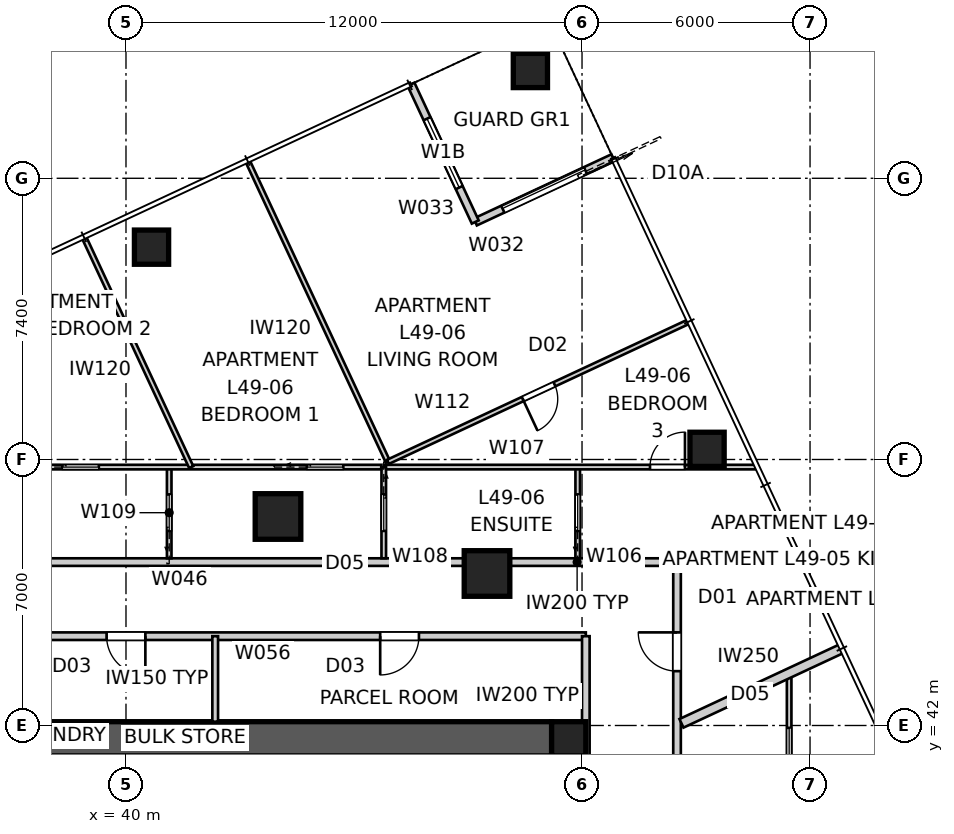
"""IFC4 building model, lengths in metres.
Left out: names, types, materials, properties, quantities, classifications, styles, units other than length and angle.
Written with IfcOpenShell. Run it as: python <this file> out.ifc"""

import sys

from ifc_helpers import new_model, si_unit, direction, frame, frame_2d, origin, origin_2d, place, context, subcontext, project, spatial, polyline, rectangle, outline, extrude, element, fill, save


model = new_model("IFC4")
c1 = context("Model", 3, precision=1e-05, world=origin(), true_north=direction((0.0, 1.0)))
c2 = subcontext(c1, "Body", "Model", "MODEL_VIEW")
j1 = project(units=[si_unit("LENGTHUNIT", "METRE"), si_unit("PLANEANGLEUNIT", "RADIAN")], contexts=[c1])
p1 = place(None, origin())
s1 = spatial("IfcSite", under=j1, at=p1, CompositionType="ELEMENT")
p2 = place(p1, origin())
s2 = spatial("IfcBuilding", under=s1, at=p2, CompositionType="ELEMENT")
p3 = place(p2, frame((0.0, 0.0, 179.4)))
s3 = spatial("IfcBuildingStorey", under=s2, at=p3, CompositionType="ELEMENT", Elevation=179.4)
p4 = place(p3, frame((28.8, 41.65, 0.0), z_axis=(0.0, 0.0, 1.0), x_axis=(1.0, 0.0, 0.0)))
e1 = element("IfcWall", 1, at=p4, inside=s3, PredefinedType="SHEAR", context=c2, shape_type="SweptSolid", body=[
    extrude(outline(polyline([(0.0, -0.45), (22.4, -0.45), (22.4, -0.025), (22.85, -0.025), (22.85, 0.025), (22.4, 0.025), (22.4, 0.45), (0.0, 0.45), (0.0, 0.025), (-0.45, 0.025), (-0.45, -0.025), (0.0, -0.025), (0.0, -0.45)])), origin(), (0.0, 0.0, 1.0), 3.4),
])
p5 = place(p3, frame((51.65, 18.8, 0.0), z_axis=(0.0, 0.0, 1.0), x_axis=(0.0, 1.0, 0.0)))
e2 = element("IfcWall", 2, at=p5, inside=s3, PredefinedType="SHEAR", context=c2, shape_type="SweptSolid", body=[
    extrude(outline(polyline([(0.0, -0.45), (22.4, -0.45), (22.4, -0.025), (22.85, -0.025), (22.85, 0.025), (22.4, 0.025), (22.4, 0.45), (0.0, 0.45), (0.0, 0.025), (-0.45, 0.025), (-0.45, -0.025), (0.0, -0.025), (0.0, -0.45)])), origin(), (0.0, 0.0, 1.0), 3.4),
])
p6 = place(p5, frame((11.14, 0.0, 0.0)))
e3 = element("IfcOpeningElement", 3, at=p6, cuts=e2, PredefinedType="OPENING", context=c2, shape_type="SweptSolid", body=[
    extrude(rectangle(XDim=1.02, YDim=2.4, at=frame_2d((0.51, 1.2))), frame((0.0, 0.46, 0.0), z_axis=(0.0, -1.0, 0.0), x_axis=(1.0, 0.0, 0.0)), (0.0, 0.0, 1.0), 0.92),
])
for number, where, z_axis, x_axis in (
    (4, (51.65, 41.65, 0.0), (0.0, 0.0, 1.0), (1.0, 0.0, 0.0)),
    (5, (55.29, 49.267, 0.0), (0.0, 0.0, 1.0), (1.0, 0.0, 0.0)),
    (6, (50.641, 59.236, 0.0), (0.0, 0.0, 1.0), (1.0, 0.0, 0.0)),
    (7, (40.672, 54.588, 0.0), (0.0, 0.0, 1.0), (1.0, 0.0, 0.0)),
):
    element("IfcColumn", number, at=place(p3, frame(where, z_axis=z_axis, x_axis=x_axis)), inside=s3, PredefinedType="COLUMN", context=c2, shape_type="SweptSolid", body=[
        extrude(rectangle(XDim=0.9, YDim=0.9, at=origin_2d()), origin(), (0.0, 0.0, 1.0), 3.4),
    ])
for number, where, z_axis, x_axis in (
    (8, (49.5, 46.0, 0.0), (0.0, 0.0, 1.0), (1.0, 0.0, 0.0)),
    (9, (44.0, 47.5, 0.0), (0.0, 0.0, 1.0), (1.0, 0.0, 0.0)),
):
    element("IfcColumn", number, at=place(p3, frame(where, z_axis=z_axis, x_axis=x_axis)), inside=s3, PredefinedType="COLUMN", context=c2, shape_type="SweptSolid", body=[
        extrude(rectangle(XDim=1.2, YDim=1.2, at=origin_2d()), origin(), (0.0, 0.0, 1.0), 3.4),
    ])
p7 = place(p3, frame((52.815, 56.94, 0.0), z_axis=(0.0, 0.0, 1.0), x_axis=(-0.906289140828, -0.422658246362, 0.0)))
e10 = element("IfcWall", 10, at=p7, inside=s3, PredefinedType="SOLIDWALL", context=c2, shape_type="SweptSolid", body=[
    extrude(rectangle(XDim=4.0, YDim=0.2, at=frame_2d((2.0, 0.0))), origin(), (0.0, 0.0, 1.0), 3.25),
])
p8 = place(p7, frame((0.8, 0.0, 0.0)))
e11 = element("IfcOpeningElement", 11, at=p8, cuts=e10, PredefinedType="OPENING", context=c2, shape_type="SweptSolid", body=[
    extrude(rectangle(XDim=2.4, YDim=2.1, at=frame_2d((1.2, 1.05))), frame((0.0, 0.11, 0.0), z_axis=(0.0, -1.0, 0.0), x_axis=(1.0, 0.0, 0.0)), (0.0, 0.0, 1.0), 0.22),
])
p9 = place(p3, frame((49.19, 55.25, 0.0), z_axis=(0.0, 0.0, 1.0), x_axis=(-0.422658246362, 0.906289140828, 0.0)))
e12 = element("IfcWall", 12, at=p9, inside=s3, PredefinedType="SOLIDWALL", context=c2, shape_type="SweptSolid", body=[
    extrude(rectangle(XDim=4.0, YDim=0.2, at=frame_2d((2.0, 0.0))), origin(), (0.0, 0.0, 1.0), 3.25),
])
p10 = place(p9, frame((1.0, 0.0, 0.45)))
e13 = element("IfcOpeningElement", 13, at=p10, cuts=e12, PredefinedType="OPENING", context=c2, shape_type="SweptSolid", body=[
    extrude(rectangle(XDim=2.0, YDim=1.8, at=frame_2d((1.0, 0.9))), frame((0.0, 0.11, 0.0), z_axis=(0.0, -1.0, 0.0), x_axis=(1.0, 0.0, 0.0)), (0.0, 0.0, 1.0), 0.22),
])
p11 = place(p3, frame((54.5, 13.7, 0.0), z_axis=(0.0, 0.0, 1.0), x_axis=(0.0, 1.0, 0.0)))
e14 = element("IfcWall", 14, at=p11, inside=s3, PredefinedType="PARTITIONING", context=c2, shape_type="SweptSolid", body=[
    extrude(rectangle(XDim=32.6, YDim=0.2, at=frame_2d((16.3, 0.0))), origin(), (0.0, 0.0, 1.0), 3.25),
])
p12 = place(p11, frame((3.326, 0.0, 0.0)))
e15 = element("IfcOpeningElement", 15, at=p12, cuts=e14, PredefinedType="OPENING", context=c2, shape_type="SweptSolid", body=[
    extrude(rectangle(XDim=1.02, YDim=2.34, at=frame_2d((0.51, 1.17))), frame((0.0, 0.11, 0.0), z_axis=(0.0, -1.0, 0.0), x_axis=(1.0, 0.0, 0.0)), (0.0, 0.0, 1.0), 0.22),
])
p13 = place(p11, frame((19.161, 0.0, 0.0)))
e16 = element("IfcOpeningElement", 16, at=p13, cuts=e14, PredefinedType="OPENING", context=c2, shape_type="SweptSolid", body=[
    extrude(rectangle(XDim=1.02, YDim=2.34, at=frame_2d((0.51, 1.17))), frame((0.0, 0.11, 0.0), z_axis=(0.0, -1.0, 0.0), x_axis=(1.0, 0.0, 0.0)), (0.0, 0.0, 1.0), 0.22),
])
p14 = place(p11, frame((29.73, 0.0, 0.0)))
e17 = element("IfcOpeningElement", 17, at=p14, cuts=e14, PredefinedType="OPENING", context=c2, shape_type="SweptSolid", body=[
    extrude(rectangle(XDim=1.02, YDim=2.34, at=frame_2d((0.51, 1.17))), frame((0.0, 0.11, 0.0), z_axis=(0.0, -1.0, 0.0), x_axis=(1.0, 0.0, 0.0)), (0.0, 0.0, 1.0), 0.22),
])
p15 = place(p11, frame((23.904, 0.0, 0.0)))
e18 = element("IfcOpeningElement", 18, at=p15, cuts=e14, PredefinedType="OPENING", context=c2, shape_type="SweptSolid", body=[
    extrude(rectangle(XDim=1.02, YDim=2.34, at=frame_2d((0.51, 1.17))), frame((0.0, 0.11, 0.0), z_axis=(0.0, -1.0, 0.0), x_axis=(1.0, 0.0, 0.0)), (0.0, 0.0, 1.0), 0.22),
])
p16 = place(p3, frame((54.5, 46.3, 0.0), z_axis=(0.0, 0.0, 1.0), x_axis=(-1.0, 0.0, 0.0)))
e19 = element("IfcWall", 19, at=p16, inside=s3, PredefinedType="PARTITIONING", context=c2, shape_type="SweptSolid", body=[
    extrude(rectangle(XDim=5.258, YDim=0.2, at=frame_2d((2.629, 0.0))), origin(), (0.0, 0.0, 1.0), 3.25),
])
p17 = place(p3, frame((49.242, 46.3, 0.0), z_axis=(0.0, 0.0, 1.0), x_axis=(-1.0, 0.0, 0.0)))
e20 = element("IfcWall", 20, at=p17, inside=s3, PredefinedType="PARTITIONING", context=c2, shape_type="SweptSolid", body=[
    extrude(rectangle(XDim=1.683, YDim=0.2, at=frame_2d((0.842, 0.0))), origin(), (0.0, 0.0, 1.0), 2.55),
])
p18 = place(p3, frame((47.558, 46.3, 0.0), z_axis=(0.0, 0.0, 1.0), x_axis=(-1.0, 0.0, 0.0)))
e21 = element("IfcWall", 21, at=p18, inside=s3, PredefinedType="PARTITIONING", context=c2, shape_type="SweptSolid", body=[
    extrude(rectangle(XDim=15.117, YDim=0.2, at=frame_2d((7.558, 0.0))), origin(), (0.0, 0.0, 1.0), 3.25),
])
p19 = place(p18, frame((12.295, 0.0, 0.0)))
e22 = element("IfcOpeningElement", 22, at=p19, cuts=e21, PredefinedType="OPENING", context=c2, shape_type="SweptSolid", body=[
    extrude(rectangle(XDim=1.02, YDim=2.34, at=frame_2d((0.51, 1.17))), frame((0.0, 0.11, 0.0), z_axis=(0.0, -1.0, 0.0), x_axis=(1.0, 0.0, 0.0)), (0.0, 0.0, 1.0), 0.22),
])
p20 = place(p3, frame((58.838, 44.025, 0.0), z_axis=(0.0, 0.0, 1.0), x_axis=(-0.906317010604, -0.422598481173, 0.0)))
e23 = element("IfcWall", 23, at=p20, inside=s3, PredefinedType="PARTITIONING", context=c2, shape_type="SweptSolid", body=[
    extrude(rectangle(XDim=4.657, YDim=0.25, at=frame_2d((2.329, 0.0))), origin(), (0.0, 0.0, 1.0), 3.25),
])
p21 = place(p3, frame((52.1, 44.35, 0.0), z_axis=(0.0, 0.0, 1.0), x_axis=(-1.0, 0.0, 0.0)))
e24 = element("IfcWall", 24, at=p21, inside=s3, PredefinedType="PARTITIONING", context=c2, shape_type="SweptSolid", body=[
    extrude(rectangle(XDim=24.2, YDim=0.2, at=frame_2d((12.1, 0.0))), origin(), (0.0, 0.0, 1.0), 3.25),
])
p22 = place(p21, frame((18.789, 0.0, 0.0)))
e25 = element("IfcOpeningElement", 25, at=p22, cuts=e24, PredefinedType="OPENING", context=c2, shape_type="SweptSolid", body=[
    extrude(rectangle(XDim=1.02, YDim=2.1, at=frame_2d((0.51, 1.05))), frame((0.0, 0.11, 0.0), z_axis=(0.0, -1.0, 0.0), x_axis=(1.0, 0.0, 0.0)), (0.0, 0.0, 1.0), 0.22),
])
p23 = place(p21, frame((4.391, 0.0, 0.0)))
e26 = element("IfcOpeningElement", 26, at=p23, cuts=e24, PredefinedType="OPENING", context=c2, shape_type="SweptSolid", body=[
    extrude(rectangle(XDim=1.02, YDim=2.1, at=frame_2d((0.51, 1.05))), frame((0.0, 0.11, 0.0), z_axis=(0.0, -1.0, 0.0), x_axis=(1.0, 0.0, 0.0)), (0.0, 0.0, 1.0), 0.22),
])
p24 = place(p21, frame((11.59, 0.0, 0.0)))
e27 = element("IfcOpeningElement", 27, at=p24, cuts=e24, PredefinedType="OPENING", context=c2, shape_type="SweptSolid", body=[
    extrude(rectangle(XDim=1.02, YDim=2.1, at=frame_2d((0.51, 1.05))), frame((0.0, 0.11, 0.0), z_axis=(0.0, -1.0, 0.0), x_axis=(1.0, 0.0, 0.0)), (0.0, 0.0, 1.0), 0.22),
])
p25 = place(p3, frame((52.1, 41.18, 0.0), z_axis=(0.0, 0.0, 1.0), x_axis=(0.0, 1.0, 0.0)))
e28 = element("IfcWall", 28, at=p25, inside=s3, PredefinedType="PARTITIONING", context=c2, shape_type="SweptSolid", body=[
    extrude(rectangle(XDim=3.17, YDim=0.2, at=frame_2d((1.585, 0.0))), origin(), (0.0, 0.0, 1.0), 3.25),
])
p26 = place(p3, frame((42.347, 42.1, 0.0), z_axis=(0.0, 0.0, 1.0), x_axis=(0.0, 1.0, 0.0)))
e29 = element("IfcWall", 29, at=p26, inside=s3, PredefinedType="SOLIDWALL", context=c2, shape_type="SweptSolid", body=[
    extrude(rectangle(XDim=2.25, YDim=0.15, at=frame_2d((1.125, 0.0))), origin(), (0.0, 0.0, 1.0), 3.25),
])
p27 = place(p3, frame((57.45, 39.538, 0.0), z_axis=(0.0, 0.0, 1.0), x_axis=(0.0, 1.0, 0.0)))
e30 = element("IfcWall", 30, at=p27, inside=s3, PredefinedType="PARTITIONING", context=c2, shape_type="SweptSolid", body=[
    extrude(rectangle(XDim=3.84, YDim=0.12, at=frame_2d((1.92, 0.0))), origin(), (0.0, 0.0, 1.0), 3.25),
])
p28 = place(p27, frame((1.44, 0.0, 0.0)))
e31 = element("IfcOpeningElement", 31, at=p28, cuts=e30, PredefinedType="OPENING", context=c2, shape_type="SweptSolid", body=[
    extrude(rectangle(XDim=0.96, YDim=2.1, at=frame_2d((0.48, 1.05))), frame((0.0, 0.07, 0.0), z_axis=(0.0, -1.0, 0.0), x_axis=(1.0, 0.0, 0.0)), (0.0, 0.0, 1.0), 0.14),
])
p29 = place(p3, frame((51.886, 46.4, 0.0), z_axis=(0.0, 0.0, 1.0), x_axis=(0.0, 1.0, 0.0)))
e32 = element("IfcWall", 32, at=p29, inside=s3, PredefinedType="PARTITIONING", context=c2, shape_type="SweptSolid", body=[
    extrude(rectangle(XDim=2.4, YDim=0.12, at=frame_2d((1.2, 0.0))), origin(), (0.0, 0.0, 1.0), 3.25),
])
p30 = place(p29, frame((0.72, 0.0, 0.0)))
e33 = element("IfcOpeningElement", 33, at=p30, cuts=e32, PredefinedType="OPENING", context=c2, shape_type="SweptSolid", body=[
    extrude(rectangle(XDim=0.96, YDim=2.1, at=frame_2d((0.48, 1.05))), frame((0.0, 0.07, 0.0), z_axis=(0.0, -1.0, 0.0), x_axis=(1.0, 0.0, 0.0)), (0.0, 0.0, 1.0), 0.14),
])
p31 = place(p3, frame((46.783, 48.8, 0.0), z_axis=(0.0, 0.0, 1.0), x_axis=(1.0, 0.0, 0.0)))
e34 = element("IfcWall", 34, at=p31, inside=s3, PredefinedType="PARTITIONING", context=c2, shape_type="SweptSolid", body=[
    extrude(rectangle(XDim=9.784, YDim=0.12, at=frame_2d((4.892, 0.0))), origin(), (0.0, 0.0, 1.0), 3.25),
])
p32 = place(p31, frame((7.006, 0.0, 0.0)))
e35 = element("IfcOpeningElement", 35, at=p32, cuts=e34, PredefinedType="OPENING", context=c2, shape_type="SweptSolid", body=[
    extrude(rectangle(XDim=0.92, YDim=2.34, at=frame_2d((0.46, 1.17))), frame((0.0, 0.07, 0.0), z_axis=(0.0, -1.0, 0.0), x_axis=(1.0, 0.0, 0.0)), (0.0, 0.0, 1.0), 0.14),
])
p33 = place(p3, frame((46.783, 48.8, 0.0), z_axis=(0.0, 0.0, 1.0), x_axis=(0.0, -1.0, 0.0)))
e36 = element("IfcWall", 36, at=p33, inside=s3, PredefinedType="PARTITIONING", context=c2, shape_type="SweptSolid", body=[
    extrude(rectangle(XDim=2.4, YDim=0.12, at=frame_2d((1.2, 0.0))), origin(), (0.0, 0.0, 1.0), 3.25),
])
p34 = place(p33, frame((0.72, 0.0, 0.0)))
e37 = element("IfcOpeningElement", 37, at=p34, cuts=e36, PredefinedType="OPENING", context=c2, shape_type="SweptSolid", body=[
    extrude(rectangle(XDim=0.96, YDim=2.1, at=frame_2d((0.48, 1.05))), frame((0.0, 0.07, 0.0), z_axis=(0.0, -1.0, 0.0), x_axis=(1.0, 0.0, 0.0)), (0.0, 0.0, 1.0), 0.14),
])
p35 = place(p3, frame((41.137, 46.4, 0.0), z_axis=(0.0, 0.0, 1.0), x_axis=(0.0, 1.0, 0.0)))
e38 = element("IfcWall", 38, at=p35, inside=s3, PredefinedType="PARTITIONING", context=c2, shape_type="SweptSolid", body=[
    extrude(rectangle(XDim=2.4, YDim=0.12, at=frame_2d((1.2, 0.0))), origin(), (0.0, 0.0, 1.0), 3.25),
])
p36 = place(p35, frame((0.72, 0.0, 0.0)))
e39 = element("IfcOpeningElement", 39, at=p36, cuts=e38, PredefinedType="OPENING", context=c2, shape_type="SweptSolid", body=[
    extrude(rectangle(XDim=0.96, YDim=2.1, at=frame_2d((0.48, 1.05))), frame((0.0, 0.07, 0.0), z_axis=(0.0, -1.0, 0.0), x_axis=(1.0, 0.0, 0.0)), (0.0, 0.0, 1.0), 0.14),
])
p37 = place(p3, frame((36.475, 48.8, 0.0), z_axis=(0.0, 0.0, 1.0), x_axis=(1.0, 0.0, 0.0)))
e40 = element("IfcWall", 40, at=p37, inside=s3, PredefinedType="PARTITIONING", context=c2, shape_type="SweptSolid", body=[
    extrude(rectangle(XDim=10.242, YDim=0.12, at=frame_2d((5.121, 0.0))), origin(), (0.0, 0.0, 1.0), 3.25),
])
p38 = place(p37, frame((8.284, 0.0, 0.0)))
e41 = element("IfcOpeningElement", 41, at=p38, cuts=e40, PredefinedType="OPENING", context=c2, shape_type="SweptSolid", body=[
    extrude(rectangle(XDim=0.96, YDim=2.1, at=frame_2d((0.48, 1.05))), frame((0.0, 0.07, 0.0), z_axis=(0.0, -1.0, 0.0), x_axis=(1.0, 0.0, 0.0)), (0.0, 0.0, 1.0), 0.14),
])
p39 = place(p37, frame((1.851, 0.0, 0.0)))
e42 = element("IfcOpeningElement", 42, at=p39, cuts=e40, PredefinedType="OPENING", context=c2, shape_type="SweptSolid", body=[
    extrude(rectangle(XDim=0.96, YDim=2.1, at=frame_2d((0.48, 1.05))), frame((0.0, 0.07, 0.0), z_axis=(0.0, -1.0, 0.0), x_axis=(1.0, 0.0, 0.0)), (0.0, 0.0, 1.0), 0.14),
])
p40 = place(p3, frame((46.893, 48.937, 0.0), z_axis=(0.0, 0.0, 1.0), x_axis=(-0.422638395676, 0.906298398156, 0.0)))
e43 = element("IfcWall", 43, at=p40, inside=s3, PredefinedType="PARTITIONING", context=c2, shape_type="SweptSolid", body=[
    extrude(rectangle(XDim=8.71, YDim=0.12, at=frame_2d((4.355, 0.0))), origin(), (0.0, 0.0, 1.0), 3.25),
])
p41 = place(p3, frame((54.787, 52.618, 0.0), z_axis=(0.0, 0.0, 1.0), x_axis=(-0.906314140712, -0.422604635972, 0.0)))
e44 = element("IfcWall", 44, at=p41, inside=s3, PredefinedType="PARTITIONING", context=c2, shape_type="SweptSolid", body=[
    extrude(rectangle(XDim=8.71, YDim=0.12, at=frame_2d((4.355, 0.0))), origin(), (0.0, 0.0, 1.0), 3.25),
])
p42 = place(p41, frame((3.875, 0.0, 0.0)))
e45 = element("IfcOpeningElement", 45, at=p42, cuts=e44, PredefinedType="OPENING", context=c2, shape_type="SweptSolid", body=[
    extrude(rectangle(XDim=0.92, YDim=2.34, at=frame_2d((0.46, 1.17))), frame((0.0, 0.07, 0.0), z_axis=(0.0, -1.0, 0.0), x_axis=(1.0, 0.0, 0.0)), (0.0, 0.0, 1.0), 0.14),
])
p43 = place(p3, frame((41.716, 48.8, 0.0), z_axis=(0.0, 0.0, 1.0), x_axis=(-0.422642131948, 0.906296655793, 0.0)))
e46 = element("IfcWall", 46, at=p43, inside=s3, PredefinedType="PARTITIONING", context=c2, shape_type="SweptSolid", body=[
    extrude(rectangle(XDim=6.646, YDim=0.12, at=frame_2d((3.323, 0.0))), origin(), (0.0, 0.0, 1.0), 3.25),
])
p44 = place(p8, origin())
e47 = element("IfcDoor", 47, at=p44, inside=s3, OperationType="SLIDING_TO_LEFT", PredefinedType="DOOR", context=c2, shape_type="SweptSolid", body=[
    extrude(rectangle(XDim=2.4, YDim=2.1, at=frame_2d((1.2, 1.05))), frame((0.0, 0.025, 0.0), z_axis=(0.0, -1.0, 0.0), x_axis=(1.0, 0.0, 0.0)), (0.0, 0.0, 1.0), 0.05),
])
fill(e11, e47)
p45 = place(p10, origin())
e48 = element("IfcWindow", 48, at=p45, inside=s3, PartitioningType="SINGLE_PANEL", PredefinedType="WINDOW", context=c2, shape_type="SweptSolid", body=[
    extrude(rectangle(XDim=2.0, YDim=1.8, at=frame_2d((1.0, 0.9))), frame((0.0, 0.03, 0.0), z_axis=(0.0, -1.0, 0.0), x_axis=(1.0, 0.0, 0.0)), (0.0, 0.0, 1.0), 0.06),
])
fill(e13, e48)
p46 = place(p23, origin())
e49 = element("IfcDoor", 49, at=p46, inside=s3, OperationType="SINGLE_SWING_RIGHT", PredefinedType="DOOR", context=c2, shape_type="SweptSolid", body=[
    extrude(rectangle(XDim=1.02, YDim=2.1, at=frame_2d((0.51, 1.05))), frame((0.0, 0.025, 0.0), z_axis=(0.0, -1.0, 0.0), x_axis=(1.0, 0.0, 0.0)), (0.0, 0.0, 1.0), 0.05),
])
fill(e26, e49)
p47 = place(p24, origin())
e50 = element("IfcDoor", 50, at=p47, inside=s3, OperationType="SINGLE_SWING_LEFT", PredefinedType="DOOR", context=c2, shape_type="SweptSolid", body=[
    extrude(rectangle(XDim=1.02, YDim=2.1, at=frame_2d((0.51, 1.05))), frame((0.0, 0.025, 0.0), z_axis=(0.0, -1.0, 0.0), x_axis=(1.0, 0.0, 0.0)), (0.0, 0.0, 1.0), 0.05),
])
fill(e27, e50)
p48 = place(p14, origin())
e51 = element("IfcDoor", 51, at=p48, inside=s3, OperationType="SINGLE_SWING_RIGHT", PredefinedType="DOOR", context=c2, shape_type="SweptSolid", body=[
    extrude(rectangle(XDim=1.02, YDim=2.34, at=frame_2d((0.51, 1.17))), frame((0.0, 0.025, 0.0), z_axis=(0.0, -1.0, 0.0), x_axis=(1.0, 0.0, 0.0)), (0.0, 0.0, 1.0), 0.05),
])
fill(e17, e51)
p49 = place(p32, origin())
e52 = element("IfcDoor", 52, at=p49, inside=s3, OperationType="SINGLE_SWING_RIGHT", PredefinedType="DOOR", context=c2, shape_type="SweptSolid", body=[
    extrude(rectangle(XDim=0.92, YDim=2.34, at=frame_2d((0.46, 1.17))), frame((0.0, 0.025, 0.0), z_axis=(0.0, -1.0, 0.0), x_axis=(1.0, 0.0, 0.0)), (0.0, 0.0, 1.0), 0.05),
])
fill(e35, e52)
p50 = place(p30, origin())
e53 = element("IfcDoor", 53, at=p50, inside=s3, OperationType="SLIDING_TO_LEFT", PredefinedType="DOOR", context=c2, shape_type="SweptSolid", body=[
    extrude(rectangle(XDim=0.96, YDim=2.1, at=frame_2d((0.48, 1.05))), frame((0.0, 0.025, 0.0), z_axis=(0.0, -1.0, 0.0), x_axis=(1.0, 0.0, 0.0)), (0.0, 0.0, 1.0), 0.05),
])
fill(e33, e53)
p51 = place(p28, origin())
e54 = element("IfcDoor", 54, at=p51, inside=s3, OperationType="SLIDING_TO_LEFT", PredefinedType="DOOR", context=c2, shape_type="SweptSolid", body=[
    extrude(rectangle(XDim=0.96, YDim=2.1, at=frame_2d((0.48, 1.05))), frame((0.0, 0.025, 0.0), z_axis=(0.0, -1.0, 0.0), x_axis=(1.0, 0.0, 0.0)), (0.0, 0.0, 1.0), 0.05),
])
fill(e31, e54)
p52 = place(p34, origin())
e55 = element("IfcDoor", 55, at=p52, inside=s3, OperationType="SLIDING_TO_LEFT", PredefinedType="DOOR", context=c2, shape_type="SweptSolid", body=[
    extrude(rectangle(XDim=0.96, YDim=2.1, at=frame_2d((0.48, 1.05))), frame((0.0, 0.025, 0.0), z_axis=(0.0, -1.0, 0.0), x_axis=(1.0, 0.0, 0.0)), (0.0, 0.0, 1.0), 0.05),
])
fill(e37, e55)
p53 = place(p38, origin())
e56 = element("IfcDoor", 56, at=p53, inside=s3, OperationType="SLIDING_TO_LEFT", PredefinedType="DOOR", context=c2, shape_type="SweptSolid", body=[
    extrude(rectangle(XDim=0.96, YDim=2.1, at=frame_2d((0.48, 1.05))), frame((0.0, 0.025, 0.0), z_axis=(0.0, -1.0, 0.0), x_axis=(1.0, 0.0, 0.0)), (0.0, 0.0, 1.0), 0.05),
])
fill(e41, e56)
p54 = place(p36, origin())
e57 = element("IfcDoor", 57, at=p54, inside=s3, OperationType="SLIDING_TO_LEFT", PredefinedType="DOOR", context=c2, shape_type="SweptSolid", body=[
    extrude(rectangle(XDim=0.96, YDim=2.1, at=frame_2d((0.48, 1.05))), frame((0.0, 0.025, 0.0), z_axis=(0.0, -1.0, 0.0), x_axis=(1.0, 0.0, 0.0)), (0.0, 0.0, 1.0), 0.05),
])
fill(e39, e57)
p55 = place(p39, origin())
e58 = element("IfcDoor", 58, at=p55, inside=s3, OperationType="SLIDING_TO_LEFT", PredefinedType="DOOR", context=c2, shape_type="SweptSolid", body=[
    extrude(rectangle(XDim=0.96, YDim=2.1, at=frame_2d((0.48, 1.05))), frame((0.0, 0.025, 0.0), z_axis=(0.0, -1.0, 0.0), x_axis=(1.0, 0.0, 0.0)), (0.0, 0.0, 1.0), 0.05),
])
fill(e42, e58)
p56 = place(p42, origin())
e59 = element("IfcDoor", 59, at=p56, inside=s3, OperationType="SINGLE_SWING_RIGHT", PredefinedType="DOOR", context=c2, shape_type="SweptSolid", body=[
    extrude(rectangle(XDim=0.92, YDim=2.34, at=frame_2d((0.46, 1.17))), frame((0.0, 0.025, 0.0), z_axis=(0.0, -1.0, 0.0), x_axis=(1.0, 0.0, 0.0)), (0.0, 0.0, 1.0), 0.05),
])
fill(e45, e59)
save(model, sys.argv[1])
